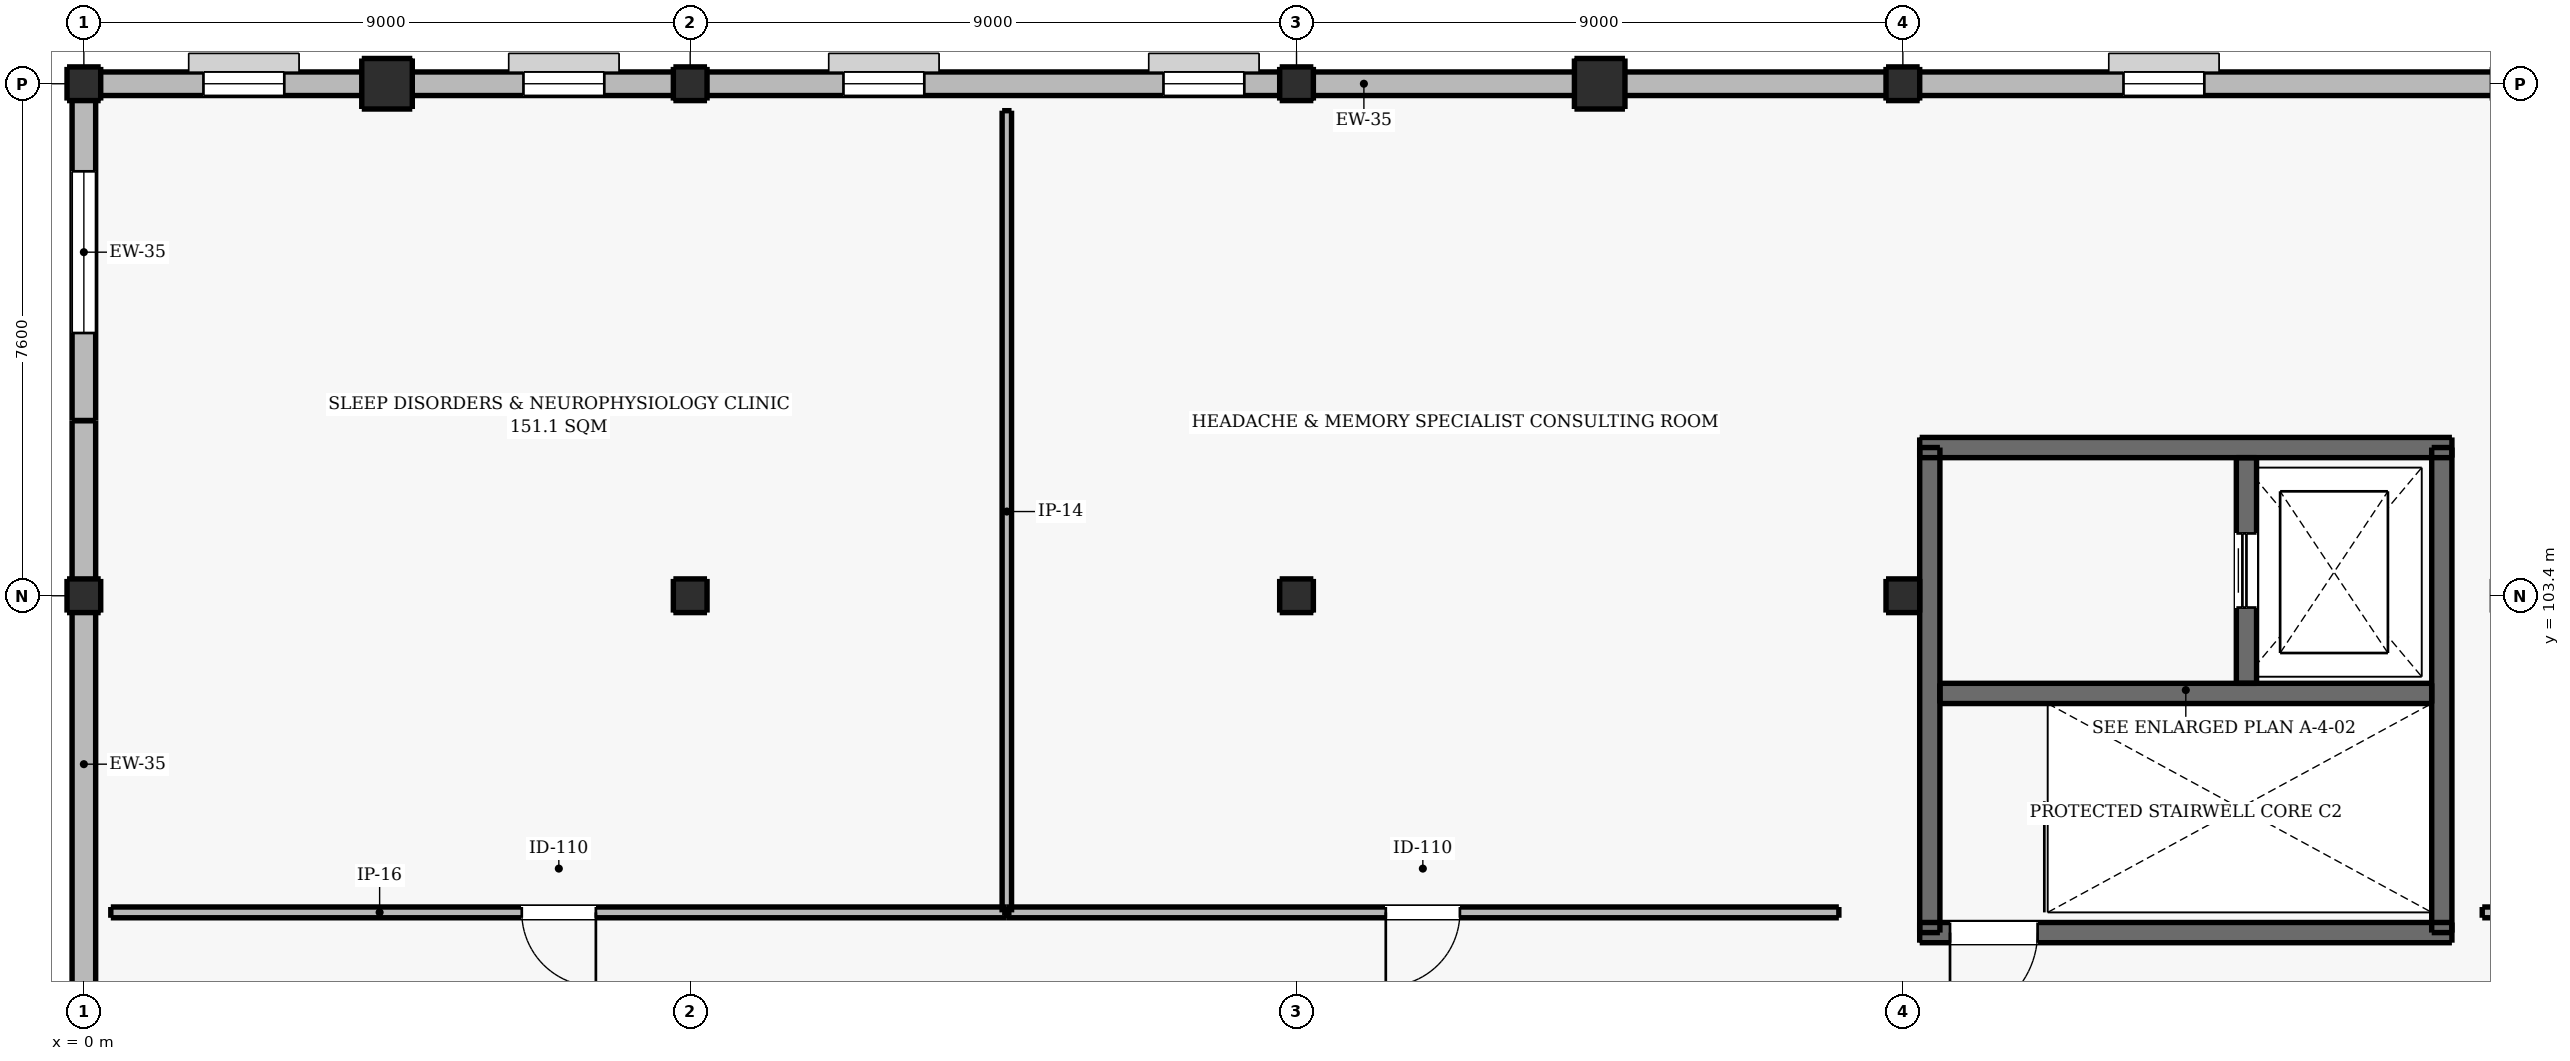
"""IFC4 building model, lengths in metres.
Left out: names, types, materials, properties, quantities, classifications, styles, units other than length and angle.
Written with IfcOpenShell. Run it as: python <this file> out.ifc"""

import sys

from ifc_helpers import new_model, si_unit, direction, frame, frame_2d, origin, origin_2d, place, context, subcontext, project, spatial, rectangle, extrude, element, fill, save


model = new_model("IFC4")
c1 = context("Model", 3, precision=1e-05, world=origin(), true_north=direction((0.0, 1.0)))
c2 = subcontext(c1, "Body", "Model", "MODEL_VIEW")
j1 = project(units=[si_unit("LENGTHUNIT", "METRE"), si_unit("PLANEANGLEUNIT", "RADIAN")], contexts=[c1])
p1 = place(None, origin())
s1 = spatial("IfcSite", under=j1, at=p1, CompositionType="ELEMENT")
p2 = place(p1, origin())
s2 = spatial("IfcBuilding", under=s1, at=p2, CompositionType="ELEMENT")
p3 = place(p2, frame((0.0, 0.0, 5.1)))
s3 = spatial("IfcBuildingStorey", under=s2, at=p3, CompositionType="ELEMENT", Elevation=5.1)
for number, where, z_axis, x_axis in (
    (1, (0.0, 103.4, 0.0), (0.0, 0.0, 1.0), (1.0, 0.0, 0.0)),
    (2, (0.0, 111.0, 0.0), (0.0, 0.0, 1.0), (1.0, 0.0, 0.0)),
):
    element("IfcColumn", number, at=place(p3, frame(where, z_axis=z_axis, x_axis=x_axis)), inside=s3, PredefinedType="COLUMN", context=c2, shape_type="SweptSolid", body=[
        extrude(rectangle(XDim=0.5, YDim=0.5, at=origin_2d()), origin(), (0.0, 0.0, 1.0), 4.5),
    ])
p4 = place(p3, frame((4.5, 111.0, 0.0), z_axis=(0.0, 0.0, 1.0), x_axis=(1.0, 0.0, 0.0)))
e3 = element("IfcColumn", 3, at=p4, inside=s3, PredefinedType="PILASTER", context=c2, shape_type="SweptSolid", body=[
    extrude(rectangle(XDim=0.75, YDim=0.75, at=origin_2d()), origin(), (0.0, 0.0, 1.0), 4.5),
])
for number, where, z_axis, x_axis in (
    (4, (9.0, 103.4, 0.0), (0.0, 0.0, 1.0), (1.0, 0.0, 0.0)),
    (5, (9.0, 111.0, 0.0), (0.0, 0.0, 1.0), (1.0, 0.0, 0.0)),
    (6, (18.0, 103.4, 0.0), (0.0, 0.0, 1.0), (1.0, 0.0, 0.0)),
    (7, (18.0, 111.0, 0.0), (0.0, 0.0, 1.0), (1.0, 0.0, 0.0)),
):
    element("IfcColumn", number, at=place(p3, frame(where, z_axis=z_axis, x_axis=x_axis)), inside=s3, PredefinedType="COLUMN", context=c2, shape_type="SweptSolid", body=[
        extrude(rectangle(XDim=0.5, YDim=0.5, at=origin_2d()), origin(), (0.0, 0.0, 1.0), 4.5),
    ])
p5 = place(p3, frame((22.5, 111.0, 0.0), z_axis=(0.0, 0.0, 1.0), x_axis=(1.0, 0.0, 0.0)))
e8 = element("IfcColumn", 8, at=p5, inside=s3, PredefinedType="PILASTER", context=c2, shape_type="SweptSolid", body=[
    extrude(rectangle(XDim=0.75, YDim=0.75, at=origin_2d()), origin(), (0.0, 0.0, 1.0), 4.5),
])
for number, where, z_axis, x_axis in (
    (9, (27.0, 103.4, 0.0), (0.0, 0.0, 1.0), (1.0, 0.0, 0.0)),
    (10, (27.0, 111.0, 0.0), (0.0, 0.0, 1.0), (1.0, 0.0, 0.0)),
):
    element("IfcColumn", number, at=place(p3, frame(where, z_axis=z_axis, x_axis=x_axis)), inside=s3, PredefinedType="COLUMN", context=c2, shape_type="SweptSolid", body=[
        extrude(rectangle(XDim=0.5, YDim=0.5, at=origin_2d()), origin(), (0.0, 0.0, 1.0), 4.5),
    ])
p6 = place(p3, frame((27.25, 98.4, 0.0), z_axis=(0.0, 0.0, 1.0), x_axis=(1.0, 0.0, 0.0)))
e11 = element("IfcWall", 11, at=p6, inside=s3, PredefinedType="SHEAR", context=c2, shape_type="SweptSolid", body=[
    extrude(rectangle(XDim=7.9, YDim=0.3, at=frame_2d((3.95, 0.0))), origin(), (0.0, 0.0, 1.0), 4.5),
])
p7 = place(p6, frame((0.45, 0.0, 0.0)))
e12 = element("IfcOpeningElement", 12, at=p7, cuts=e11, PredefinedType="OPENING", context=c2, shape_type="SweptSolid", body=[
    extrude(rectangle(XDim=1.3, YDim=2.15, at=frame_2d((0.65, 1.075))), frame((0.0, 0.16, 0.0), z_axis=(0.0, -1.0, 0.0), x_axis=(1.0, 0.0, 0.0)), (0.0, 0.0, 1.0), 0.32),
])
p8 = place(p3, frame((27.25, 105.6, 0.0), z_axis=(0.0, 0.0, 1.0), x_axis=(1.0, 0.0, 0.0)))
e13 = element("IfcWall", 13, at=p8, inside=s3, PredefinedType="SHEAR", context=c2, shape_type="SweptSolid", body=[
    extrude(rectangle(XDim=7.9, YDim=0.3, at=frame_2d((3.95, 0.0))), origin(), (0.0, 0.0, 1.0), 4.5),
])
for number, where, z_axis, x_axis in (
    (14, (27.4, 98.4, 0.0), (0.0, 0.0, 1.0), (0.0, 1.0, 0.0)),
    (15, (35.0, 98.4, 0.0), (0.0, 0.0, 1.0), (0.0, 1.0, 0.0)),
):
    element("IfcWall", number, at=place(p3, frame(where, z_axis=z_axis, x_axis=x_axis)), inside=s3, PredefinedType="SHEAR", context=c2, shape_type="SweptSolid", body=[
        extrude(rectangle(XDim=7.2, YDim=0.3, at=frame_2d((3.6, 0.0))), origin(), (0.0, 0.0, 1.0), 4.5),
    ])
p9 = place(p3, frame((27.55, 101.95, 0.0), z_axis=(0.0, 0.0, 1.0), x_axis=(1.0, 0.0, 0.0)))
e16 = element("IfcWall", 16, at=p9, inside=s3, PredefinedType="SHEAR", context=c2, shape_type="SweptSolid", body=[
    extrude(rectangle(XDim=7.3, YDim=0.3, at=frame_2d((3.65, 0.0))), origin(), (0.0, 0.0, 1.0), 4.5),
])
p10 = place(p3, frame((32.1, 102.1, 0.0), z_axis=(0.0, 0.0, 1.0), x_axis=(0.0, 1.0, 0.0)))
e17 = element("IfcWall", 17, at=p10, inside=s3, PredefinedType="SHEAR", context=c2, shape_type="SweptSolid", body=[
    extrude(rectangle(XDim=3.35, YDim=0.3, at=frame_2d((1.675, 0.0))), origin(), (0.0, 0.0, 1.0), 4.5),
])
p11 = place(p10, frame((1.125, 0.0, 0.0)))
e18 = element("IfcOpeningElement", 18, at=p11, cuts=e17, PredefinedType="OPENING", context=c2, shape_type="SweptSolid", body=[
    extrude(rectangle(XDim=1.1, YDim=2.15, at=frame_2d((0.55, 1.075))), frame((0.0, 0.16, 0.0), z_axis=(0.0, -1.0, 0.0), x_axis=(1.0, 0.0, 0.0)), (0.0, 0.0, 1.0), 0.32),
])
p12 = place(p3, frame((0.0, 95.8, 0.0), z_axis=(0.0, 0.0, 1.0), x_axis=(0.0, 1.0, 0.0)))
e19 = element("IfcWall", 19, at=p12, inside=s3, PredefinedType="SOLIDWALL", context=c2, shape_type="SweptSolid", body=[
    extrude(rectangle(XDim=10.2, YDim=0.35, at=frame_2d((5.1, 0.0))), origin(), (0.0, 0.0, 1.0), 3.28),
])
p13 = place(p3, frame((0.0, 106.0, 0.0), z_axis=(0.0, 0.0, 1.0), x_axis=(0.0, 1.0, 0.0)))
e20 = element("IfcWall", 20, at=p13, inside=s3, PredefinedType="SOLIDWALL", context=c2, shape_type="SweptSolid", body=[
    extrude(rectangle(XDim=5.0, YDim=0.35, at=frame_2d((2.5, 0.0))), origin(), (0.0, 0.0, 1.0), 3.33),
])
p14 = place(p13, frame((1.3, 0.0, 0.95)))
e21 = element("IfcOpeningElement", 21, at=p14, cuts=e20, PredefinedType="OPENING", context=c2, shape_type="SweptSolid", body=[
    extrude(rectangle(XDim=2.4, YDim=1.75, at=frame_2d((1.2, 0.875))), frame((0.0, 0.185, 0.0), z_axis=(0.0, -1.0, 0.0), x_axis=(1.0, 0.0, 0.0)), (0.0, 0.0, 1.0), 0.37),
])
p15 = place(p3, frame((0.0, 111.0, 0.0), z_axis=(0.0, 0.0, 1.0), x_axis=(1.0, 0.0, 0.0)))
e22 = element("IfcWall", 22, at=p15, inside=s3, PredefinedType="SOLIDWALL", context=c2, shape_type="SweptSolid", body=[
    extrude(rectangle(XDim=38.0, YDim=0.35, at=frame_2d((19.0, 0.0))), origin(), (0.0, 0.0, 1.0), 3.33),
])
p16 = place(p15, frame((1.775, 0.0, 1.065)))
e23 = element("IfcOpeningElement", 23, at=p16, cuts=e22, PredefinedType="OPENING", context=c2, shape_type="SweptSolid", body=[
    extrude(rectangle(XDim=1.2, YDim=1.2, at=frame_2d((0.6, 0.6))), frame((0.0, 0.185, 0.0), z_axis=(0.0, -1.0, 0.0), x_axis=(1.0, 0.0, 0.0)), (0.0, 0.0, 1.0), 0.37),
])
p17 = place(p15, frame((6.525, 0.0, 1.065)))
e24 = element("IfcOpeningElement", 24, at=p17, cuts=e22, PredefinedType="OPENING", context=c2, shape_type="SweptSolid", body=[
    extrude(rectangle(XDim=1.2, YDim=1.2, at=frame_2d((0.6, 0.6))), frame((0.0, 0.185, 0.0), z_axis=(0.0, -1.0, 0.0), x_axis=(1.0, 0.0, 0.0)), (0.0, 0.0, 1.0), 0.37),
])
p18 = place(p15, frame((11.275, 0.0, 1.065)))
e25 = element("IfcOpeningElement", 25, at=p18, cuts=e22, PredefinedType="OPENING", context=c2, shape_type="SweptSolid", body=[
    extrude(rectangle(XDim=1.2, YDim=1.2, at=frame_2d((0.6, 0.6))), frame((0.0, 0.185, 0.0), z_axis=(0.0, -1.0, 0.0), x_axis=(1.0, 0.0, 0.0)), (0.0, 0.0, 1.0), 0.37),
])
p19 = place(p15, frame((16.025, 0.0, 1.065)))
e26 = element("IfcOpeningElement", 26, at=p19, cuts=e22, PredefinedType="OPENING", context=c2, shape_type="SweptSolid", body=[
    extrude(rectangle(XDim=1.2, YDim=1.2, at=frame_2d((0.6, 0.6))), frame((0.0, 0.185, 0.0), z_axis=(0.0, -1.0, 0.0), x_axis=(1.0, 0.0, 0.0)), (0.0, 0.0, 1.0), 0.37),
])
p20 = place(p15, frame((30.275, 0.0, 1.065)))
e27 = element("IfcOpeningElement", 27, at=p20, cuts=e22, PredefinedType="OPENING", context=c2, shape_type="SweptSolid", body=[
    extrude(rectangle(XDim=1.2, YDim=1.2, at=frame_2d((0.6, 0.6))), frame((0.0, 0.185, 0.0), z_axis=(0.0, -1.0, 0.0), x_axis=(1.0, 0.0, 0.0)), (0.0, 0.0, 1.0), 0.37),
])
p21 = place(p3, frame((35.6, 98.7, 0.0), z_axis=(0.0, 0.0, 1.0), x_axis=(1.0, 0.0, 0.0)))
e28 = element("IfcWall", 28, at=p21, inside=s3, PredefinedType="PARTITIONING", context=c2, shape_type="SweptSolid", body=[
    extrude(rectangle(XDim=25.0, YDim=0.16, at=frame_2d((12.5, 0.0))), origin(), (0.0, 0.0, 1.0), 4.21),
])
p22 = place(p21, frame((11.6, 0.0, 0.0)))
e29 = element("IfcOpeningElement", 29, at=p22, cuts=e28, PredefinedType="OPENING", context=c2, shape_type="SweptSolid", body=[
    extrude(rectangle(XDim=1.8, YDim=2.25, at=frame_2d((0.9, 1.125))), frame((0.0, 0.09, 0.0), z_axis=(0.0, -1.0, 0.0), x_axis=(1.0, 0.0, 0.0)), (0.0, 0.0, 1.0), 0.18),
])
p23 = place(p3, frame((0.4, 98.7, 0.0), z_axis=(0.0, 0.0, 1.0), x_axis=(1.0, 0.0, 0.0)))
e30 = element("IfcWall", 30, at=p23, inside=s3, PredefinedType="PARTITIONING", context=c2, shape_type="SweptSolid", body=[
    extrude(rectangle(XDim=13.3, YDim=0.16, at=frame_2d((6.65, 0.0))), origin(), (0.0, 0.0, 1.0), 4.21),
])
p24 = place(p23, frame((6.1, 0.0, 0.0)))
e31 = element("IfcOpeningElement", 31, at=p24, cuts=e30, PredefinedType="OPENING", context=c2, shape_type="SweptSolid", body=[
    extrude(rectangle(XDim=1.1, YDim=2.15, at=frame_2d((0.55, 1.075))), frame((0.0, 0.09, 0.0), z_axis=(0.0, -1.0, 0.0), x_axis=(1.0, 0.0, 0.0)), (0.0, 0.0, 1.0), 0.18),
])
p25 = place(p3, frame((13.7, 98.7, 0.0), z_axis=(0.0, 0.0, 1.0), x_axis=(0.0, 1.0, 0.0)))
e32 = element("IfcWall", 32, at=p25, inside=s3, PredefinedType="PARTITIONING", context=c2, shape_type="SweptSolid", body=[
    extrude(rectangle(XDim=11.9, YDim=0.14, at=frame_2d((5.95, 0.0))), origin(), (0.0, 0.0, 1.0), 4.21),
])
p26 = place(p3, frame((13.7, 98.7, 0.0), z_axis=(0.0, 0.0, 1.0), x_axis=(1.0, 0.0, 0.0)))
e33 = element("IfcWall", 33, at=p26, inside=s3, PredefinedType="PARTITIONING", context=c2, shape_type="SweptSolid", body=[
    extrude(rectangle(XDim=12.35, YDim=0.16, at=frame_2d((6.175, 0.0))), origin(), (0.0, 0.0, 1.0), 4.21),
])
p27 = place(p26, frame((5.625, 0.0, 0.0)))
e34 = element("IfcOpeningElement", 34, at=p27, cuts=e33, PredefinedType="OPENING", context=c2, shape_type="SweptSolid", body=[
    extrude(rectangle(XDim=1.1, YDim=2.15, at=frame_2d((0.55, 1.075))), frame((0.0, 0.09, 0.0), z_axis=(0.0, -1.0, 0.0), x_axis=(1.0, 0.0, 0.0)), (0.0, 0.0, 1.0), 0.18),
])
p28 = place(p14, origin())
e35 = element("IfcWindow", 35, at=p28, inside=s3, PartitioningType="SINGLE_PANEL", PredefinedType="WINDOW", context=c2, shape_type="SweptSolid", body=[
    extrude(rectangle(XDim=2.4, YDim=1.75, at=frame_2d((1.2, 0.875))), frame((0.0, 0.03, 0.0), z_axis=(0.0, -1.0, 0.0), x_axis=(1.0, 0.0, 0.0)), (0.0, 0.0, 1.0), 0.06),
])
fill(e21, e35)
p29 = place(p16, origin())
e36 = element("IfcWindow", 36, at=p29, inside=s3, PartitioningType="SINGLE_PANEL", PredefinedType="WINDOW", context=c2, shape_type="SweptSolid", body=[
    extrude(rectangle(XDim=1.2, YDim=1.2, at=frame_2d((0.6, 0.6))), frame((0.0, 0.03, 0.0), z_axis=(0.0, -1.0, 0.0), x_axis=(1.0, 0.0, 0.0)), (0.0, 0.0, 1.0), 0.06),
])
fill(e23, e36)
p30 = place(p17, origin())
e37 = element("IfcWindow", 37, at=p30, inside=s3, PartitioningType="SINGLE_PANEL", PredefinedType="WINDOW", context=c2, shape_type="SweptSolid", body=[
    extrude(rectangle(XDim=1.2, YDim=1.2, at=frame_2d((0.6, 0.6))), frame((0.0, 0.03, 0.0), z_axis=(0.0, -1.0, 0.0), x_axis=(1.0, 0.0, 0.0)), (0.0, 0.0, 1.0), 0.06),
])
fill(e24, e37)
p31 = place(p18, origin())
e38 = element("IfcWindow", 38, at=p31, inside=s3, PartitioningType="SINGLE_PANEL", PredefinedType="WINDOW", context=c2, shape_type="SweptSolid", body=[
    extrude(rectangle(XDim=1.2, YDim=1.2, at=frame_2d((0.6, 0.6))), frame((0.0, 0.03, 0.0), z_axis=(0.0, -1.0, 0.0), x_axis=(1.0, 0.0, 0.0)), (0.0, 0.0, 1.0), 0.06),
])
fill(e25, e38)
p32 = place(p19, origin())
e39 = element("IfcWindow", 39, at=p32, inside=s3, PartitioningType="SINGLE_PANEL", PredefinedType="WINDOW", context=c2, shape_type="SweptSolid", body=[
    extrude(rectangle(XDim=1.2, YDim=1.2, at=frame_2d((0.6, 0.6))), frame((0.0, 0.03, 0.0), z_axis=(0.0, -1.0, 0.0), x_axis=(1.0, 0.0, 0.0)), (0.0, 0.0, 1.0), 0.06),
])
fill(e26, e39)
p33 = place(p20, origin())
e40 = element("IfcWindow", 40, at=p33, inside=s3, PartitioningType="SINGLE_PANEL", PredefinedType="WINDOW", context=c2, shape_type="SweptSolid", body=[
    extrude(rectangle(XDim=1.2, YDim=1.2, at=frame_2d((0.6, 0.6))), frame((0.0, 0.03, 0.0), z_axis=(0.0, -1.0, 0.0), x_axis=(1.0, 0.0, 0.0)), (0.0, 0.0, 1.0), 0.06),
])
fill(e27, e40)
p34 = place(p11, origin())
e41 = element("IfcDoor", 41, at=p34, inside=s3, OperationType="DOUBLE_DOOR_SLIDING", PredefinedType="DOOR", context=c2, shape_type="SweptSolid", body=[
    extrude(rectangle(XDim=1.1, YDim=2.15, at=frame_2d((0.55, 1.075))), frame((0.0, 0.025, 0.0), z_axis=(0.0, -1.0, 0.0), x_axis=(1.0, 0.0, 0.0)), (0.0, 0.0, 1.0), 0.05),
])
fill(e18, e41)
p35 = place(p7, frame((1.3, 0.0, 0.0), z_axis=(0.0, 0.0, 1.0), x_axis=(-1.0, 0.0, 0.0)))
e42 = element("IfcDoor", 42, at=p35, inside=s3, OperationType="SINGLE_SWING_LEFT", PredefinedType="DOOR", context=c2, shape_type="SweptSolid", body=[
    extrude(rectangle(XDim=1.3, YDim=2.15, at=frame_2d((0.65, 1.075))), frame((0.0, 0.025, 0.0), z_axis=(0.0, -1.0, 0.0), x_axis=(1.0, 0.0, 0.0)), (0.0, 0.0, 1.0), 0.05),
])
fill(e12, e42)
p36 = place(p24, frame((1.1, 0.0, 0.0), z_axis=(0.0, 0.0, 1.0), x_axis=(-1.0, 0.0, 0.0)))
e43 = element("IfcDoor", 43, at=p36, inside=s3, OperationType="SINGLE_SWING_RIGHT", PredefinedType="DOOR", context=c2, shape_type="SweptSolid", body=[
    extrude(rectangle(XDim=1.1, YDim=2.15, at=frame_2d((0.55, 1.075))), frame((0.0, 0.025, 0.0), z_axis=(0.0, -1.0, 0.0), x_axis=(1.0, 0.0, 0.0)), (0.0, 0.0, 1.0), 0.05),
])
fill(e31, e43)
p37 = place(p27, frame((1.1, 0.0, 0.0), z_axis=(0.0, 0.0, 1.0), x_axis=(-1.0, 0.0, 0.0)))
e44 = element("IfcDoor", 44, at=p37, inside=s3, OperationType="SINGLE_SWING_LEFT", PredefinedType="DOOR", context=c2, shape_type="SweptSolid", body=[
    extrude(rectangle(XDim=1.1, YDim=2.15, at=frame_2d((0.55, 1.075))), frame((0.0, 0.025, 0.0), z_axis=(0.0, -1.0, 0.0), x_axis=(1.0, 0.0, 0.0)), (0.0, 0.0, 1.0), 0.05),
])
fill(e34, e44)
save(model, sys.argv[1])
